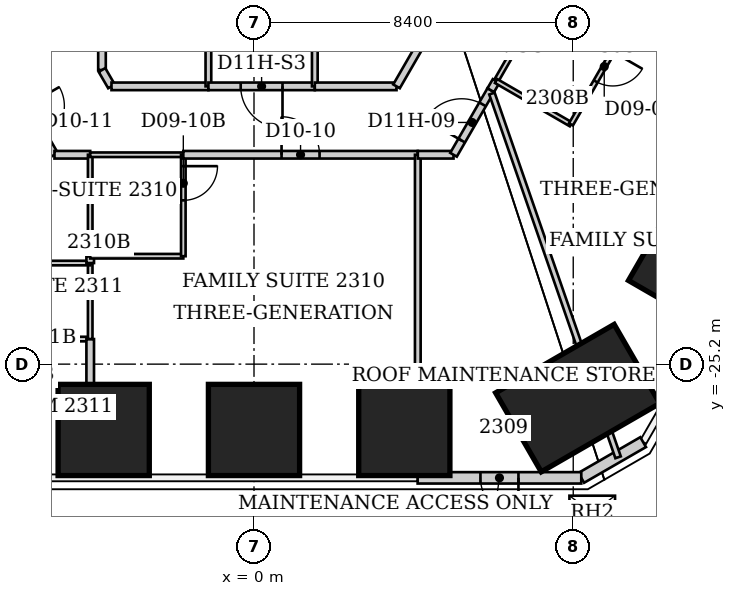
"""IFC4 building model, lengths in metres.
Left out: names, types, materials, properties, quantities, classifications, styles, units other than length and angle.
Written with IfcOpenShell. Run it as: python <this file> out.ifc"""

import sys

from ifc_helpers import new_model, si_unit, direction, frame, frame_2d, origin, origin_2d, place, context, subcontext, project, spatial, rectangle, extrude, clip, halfspace, element, fill, save


model = new_model("IFC4")
c1 = context("Model", 3, precision=1e-05, world=origin(), true_north=direction((0.0, 1.0)))
c2 = subcontext(c1, "Body", "Model", "MODEL_VIEW")
j1 = project(units=[si_unit("LENGTHUNIT", "METRE"), si_unit("PLANEANGLEUNIT", "RADIAN")], contexts=[c1])
p1 = place(None, origin())
s1 = spatial("IfcSite", under=j1, at=p1, CompositionType="ELEMENT")
p2 = place(p1, origin())
s2 = spatial("IfcBuilding", under=s1, at=p2, CompositionType="ELEMENT")
p3 = place(p2, frame((0.0, 0.0, 96.8)))
s3 = spatial("IfcBuildingStorey", under=s2, at=p3, CompositionType="ELEMENT", Elevation=96.8)
p4 = place(p3, frame((11.494, -22.559, -0.073), z_axis=(0.0, 0.0, 1.0), x_axis=(0.866025403784, -0.5, 0.0)))
e1 = element("IfcColumn", 1, at=p4, inside=s3, PredefinedType="COLUMN", context=c2, shape_type="SweptSolid", body=[
    clip(extrude(rectangle(XDim=2.4, YDim=2.4, at=origin_2d()), origin(), (0.0, 0.0, 1.0), 3.873), halfspace(frame((0.0, 0.0, 0.073)), True)),
])
p5 = place(p3, frame((8.518, -26.094, -0.074), z_axis=(0.0, 0.0, 1.0), x_axis=(0.5, -0.866025403784, 0.0)))
e2 = element("IfcColumn", 2, at=p5, inside=s3, PredefinedType="COLUMN", context=c2, shape_type="SweptSolid", body=[
    clip(extrude(rectangle(XDim=2.4, YDim=3.6, at=origin_2d()), origin(), (0.0, 0.0, 1.0), 3.874), halfspace(frame((0.0, 0.0, 0.074)), True)),
])
p6 = place(p3, frame((3.955, -26.932, -0.063), z_axis=(0.0, 0.0, 1.0), x_axis=(0.0, -1.0, 0.0)))
e3 = element("IfcColumn", 3, at=p6, inside=s3, PredefinedType="COLUMN", context=c2, shape_type="SweptSolid", body=[
    clip(extrude(rectangle(XDim=2.4, YDim=2.4, at=origin_2d()), origin(), (0.0, 0.0, 1.0), 3.863), halfspace(frame((0.0, 0.0, 0.063)), True)),
])
p7 = place(p3, frame((0.0, -26.932, -0.055), z_axis=(0.0, 0.0, 1.0), x_axis=(0.0, -1.0, 0.0)))
e4 = element("IfcColumn", 4, at=p7, inside=s3, PredefinedType="COLUMN", context=c2, shape_type="SweptSolid", body=[
    clip(extrude(rectangle(XDim=2.4, YDim=2.4, at=origin_2d()), origin(), (0.0, 0.0, 1.0), 3.855), halfspace(frame((0.0, 0.0, 0.055)), True)),
])
p8 = place(p3, frame((-3.955, -26.932, -0.063), z_axis=(0.0, 0.0, 1.0), x_axis=(0.0, -1.0, 0.0)))
e5 = element("IfcColumn", 5, at=p8, inside=s3, PredefinedType="COLUMN", context=c2, shape_type="SweptSolid", body=[
    clip(extrude(rectangle(XDim=2.4, YDim=2.4, at=origin_2d()), origin(), (0.0, 0.0, 1.0), 3.863), halfspace(frame((0.0, 0.0, 0.063)), True)),
])
p9 = place(p3, frame((10.24, -27.252, 0.0), z_axis=(0.0, 0.0, 1.0), x_axis=(-0.866045024864, -0.499966013754, 0.0)))
e6 = element("IfcWall", 6, at=p9, inside=s3, PredefinedType="SOLIDWALL", context=c2, shape_type="SweptSolid", body=[
    extrude(rectangle(XDim=1.88, YDim=0.3, at=frame_2d((0.94, 0.0))), origin(), (0.0, 0.0, 1.0), 3.64),
])
p10 = place(p3, frame((8.611, -28.192, 0.0), z_axis=(0.0, 0.0, 1.0), x_axis=(-1.0, 0.0, 0.0)))
e7 = element("IfcWall", 7, at=p10, inside=s3, PredefinedType="SOLIDWALL", context=c2, shape_type="SweptSolid", body=[
    extrude(rectangle(XDim=4.306, YDim=0.3, at=frame_2d((2.153, 0.0))), origin(), (0.0, 0.0, 1.0), 3.64),
])
p11 = place(p10, frame((1.653, 0.0, 0.0)))
e8 = element("IfcOpeningElement", 8, at=p11, cuts=e7, PredefinedType="OPENING", context=c2, shape_type="SweptSolid", body=[
    extrude(rectangle(XDim=1.0, YDim=2.2, at=frame_2d((0.5, 1.1))), frame((0.0, 0.15, 0.0), z_axis=(0.0, -1.0, 0.0), x_axis=(1.0, 0.0, 0.0)), (0.0, 0.0, 1.0), 0.3),
])
p12 = place(p3, frame((9.301, -30.167, 0.0), z_axis=(0.0, 0.0, 1.0), x_axis=(0.865627711351, 0.500688191733, 0.0)))
e9 = element("IfcWall", 9, at=p12, inside=s3, PredefinedType="PARAPET", context=c2, shape_type="SweptSolid", body=[
    extrude(rectangle(XDim=1.991, YDim=0.25, at=frame_2d((0.996, 0.0))), origin(), (0.0, 0.0, 1.0), 1.1),
])
p13 = place(p3, frame((-6.71, -24.54, 0.0), z_axis=(0.0, 0.0, 1.0), x_axis=(1.0, 0.0, 0.0)))
e10 = element("IfcWall", 10, at=p13, inside=s3, PredefinedType="PARTITIONING", context=c2, shape_type="SweptSolid", body=[
    extrude(rectangle(XDim=2.4, YDim=0.12, at=frame_2d((1.2, 0.0))), origin(), (0.0, 0.0, 1.0), 3.64),
])
p14 = place(p13, frame((0.45, 0.0, 0.0)))
e11 = element("IfcOpeningElement", 11, at=p14, cuts=e10, PredefinedType="OPENING", context=c2, shape_type="SweptSolid", body=[
    extrude(rectangle(XDim=0.9, YDim=2.03, at=frame_2d((0.45, 1.015))), frame((0.0, 0.06, 0.0), z_axis=(0.0, -1.0, 0.0), x_axis=(1.0, 0.0, 0.0)), (0.0, 0.0, 1.0), 0.12),
])
p15 = place(p3, frame((-6.23, -17.99, 0.0), z_axis=(0.0, 0.0, 1.0), x_axis=(0.499431599995, -0.866353321068, 0.0)))
e12 = element("IfcWall", 12, at=p15, inside=s3, PredefinedType="PARTITIONING", context=c2, shape_type="SweptSolid", body=[
    extrude(rectangle(XDim=1.962, YDim=0.2, at=frame_2d((0.981, 0.0))), origin(), (0.0, 0.0, 1.0), 3.64),
])
p16 = place(p15, frame((0.481, 0.0, 0.0)))
e13 = element("IfcOpeningElement", 13, at=p16, cuts=e12, PredefinedType="OPENING", context=c2, shape_type="SweptSolid", body=[
    extrude(rectangle(XDim=1.0, YDim=2.13, at=frame_2d((0.5, 1.065))), frame((0.0, 0.1, 0.0), z_axis=(0.0, -1.0, 0.0), x_axis=(1.0, 0.0, 0.0)), (0.0, 0.0, 1.0), 0.2),
])
p17 = place(p3, frame((-5.25, -19.69, 0.0), z_axis=(0.0, 0.0, 1.0), x_axis=(1.0, 0.0, 0.0)))
e14 = element("IfcWall", 14, at=p17, inside=s3, PredefinedType="PARTITIONING", context=c2, shape_type="SweptSolid", body=[
    extrude(rectangle(XDim=0.94, YDim=0.2, at=frame_2d((0.47, 0.0))), origin(), (0.0, 0.0, 1.0), 3.64),
])
p18 = place(p3, frame((-4.31, -28.07, 0.0), z_axis=(0.0, 0.0, 1.0), x_axis=(0.0, 1.0, 0.0)))
e15 = element("IfcWall", 15, at=p18, inside=s3, PredefinedType="PARTITIONING", context=c2, shape_type="SweptSolid", body=[
    extrude(rectangle(XDim=3.53, YDim=0.2, at=frame_2d((1.765, 0.0))), origin(), (0.0, 0.0, 1.0), 3.64),
])
p19 = place(p3, frame((-4.31, -24.54, 0.0), z_axis=(0.0, 0.0, 1.0), x_axis=(0.0, 1.0, 0.0)))
e16 = element("IfcWall", 16, at=p19, inside=s3, PredefinedType="PARTITIONING", context=c2, shape_type="SweptSolid", body=[
    extrude(rectangle(XDim=2.0, YDim=0.12, at=frame_2d((1.0, 0.0))), origin(), (0.0, 0.0, 1.0), 3.64),
])
p20 = place(p3, frame((-4.31, -22.54, 0.0), z_axis=(0.0, 0.0, 1.0), x_axis=(-1.0, 0.0, 0.0)))
e17 = element("IfcWall", 17, at=p20, inside=s3, PredefinedType="PARTITIONING", context=c2, shape_type="SweptSolid", body=[
    extrude(rectangle(XDim=2.4, YDim=0.12, at=frame_2d((1.2, 0.0))), origin(), (0.0, 0.0, 1.0), 3.64),
])
p21 = place(p3, frame((-4.31, -22.54, 0.0), z_axis=(0.0, 0.0, 1.0), x_axis=(0.0, 1.0, 0.0)))
e18 = element("IfcWall", 18, at=p21, inside=s3, PredefinedType="PARTITIONING", context=c2, shape_type="SweptSolid", body=[
    extrude(rectangle(XDim=0.18, YDim=0.2, at=frame_2d((0.09, 0.0))), origin(), (0.0, 0.0, 1.0), 3.64),
])
p22 = place(p3, frame((-4.31, -22.36, 0.0), z_axis=(0.0, 0.0, 1.0), x_axis=(0.0, 1.0, 0.0)))
e19 = element("IfcWall", 19, at=p22, inside=s3, PredefinedType="PARTITIONING", context=c2, shape_type="SweptSolid", body=[
    extrude(rectangle(XDim=2.67, YDim=0.12, at=frame_2d((1.335, 0.0))), origin(), (0.0, 0.0, 1.0), 3.64),
])
for number, where, z_axis, x_axis in (
    (20, (-4.31, -22.36, 0.0), (0.0, 0.0, 1.0), (1.0, 0.0, 0.0)),
    (21, (-4.31, -19.69, 0.0), (0.0, 0.0, 1.0), (1.0, 0.0, 0.0)),
):
    element("IfcWall", number, at=place(p3, frame(where, z_axis=z_axis, x_axis=x_axis)), inside=s3, PredefinedType="PARTITIONING", context=c2, shape_type="SweptSolid", body=[
        extrude(rectangle(XDim=2.45, YDim=0.12, at=frame_2d((1.225, 0.0))), origin(), (0.0, 0.0, 1.0), 3.64),
    ])
p23 = place(p3, frame((-4.0, -17.46, 0.0), z_axis=(0.0, 0.0, 1.0), x_axis=(0.0, 1.0, 0.0)))
e22 = element("IfcWall", 22, at=p23, inside=s3, PredefinedType="PARTITIONING", context=c2, shape_type="SweptSolid", body=[
    extrude(rectangle(XDim=3.71, YDim=0.2, at=frame_2d((1.855, 0.0))), origin(), (0.0, 0.0, 1.0), 2.878),
])
p24 = place(p23, frame((1.305, 0.0, 0.0)))
e23 = element("IfcOpeningElement", 23, at=p24, cuts=e22, PredefinedType="OPENING", context=c2, shape_type="SweptSolid", body=[
    extrude(rectangle(XDim=1.1, YDim=2.2, at=frame_2d((0.55, 1.1))), frame((0.0, 0.1, 0.0), z_axis=(0.0, -1.0, 0.0), x_axis=(1.0, 0.0, 0.0)), (0.0, 0.0, 1.0), 0.2),
])
p25 = place(p3, frame((-3.75, -17.89, 0.0), z_axis=(0.0, 0.0, 1.0), x_axis=(-0.502680181512, 0.864472460588, 0.0)))
e24 = element("IfcWall", 24, at=p25, inside=s3, PredefinedType="PARTITIONING", context=c2, shape_type="SweptSolid", body=[
    extrude(rectangle(XDim=0.497, YDim=0.2, at=frame_2d((0.249, 0.0))), origin(), (0.0, 0.0, 1.0), 3.64),
])
p26 = place(p3, frame((-1.86, -22.36, 0.0), z_axis=(0.0, 0.0, 1.0), x_axis=(0.0, 1.0, 0.0)))
e25 = element("IfcWall", 25, at=p26, inside=s3, PredefinedType="PARTITIONING", context=c2, shape_type="SweptSolid", body=[
    extrude(rectangle(XDim=2.67, YDim=0.12, at=frame_2d((1.335, 0.0))), origin(), (0.0, 0.0, 1.0), 2.86),
])
p27 = place(p26, frame((1.47, 0.0, 0.0)))
e26 = element("IfcOpeningElement", 26, at=p27, cuts=e25, PredefinedType="OPENING", context=c2, shape_type="SweptSolid", body=[
    extrude(rectangle(XDim=0.9, YDim=2.03, at=frame_2d((0.45, 1.015))), frame((0.0, 0.06, 0.0), z_axis=(0.0, -1.0, 0.0), x_axis=(1.0, 0.0, 0.0)), (0.0, 0.0, 1.0), 0.12),
])
p28 = place(p3, frame((-1.86, -19.69, 0.0), z_axis=(0.0, 0.0, 1.0), x_axis=(1.0, 0.0, 0.0)))
e27 = element("IfcWall", 27, at=p28, inside=s3, PredefinedType="PARTITIONING", context=c2, shape_type="SweptSolid", body=[
    extrude(rectangle(XDim=6.17, YDim=0.2, at=frame_2d((3.085, 0.0))), origin(), (0.0, 0.0, 1.0), 3.64),
])
p29 = place(p28, frame((2.585, 0.0, 0.0)))
e28 = element("IfcOpeningElement", 28, at=p29, cuts=e27, PredefinedType="OPENING", context=c2, shape_type="SweptSolid", body=[
    extrude(rectangle(XDim=1.0, YDim=2.13, at=frame_2d((0.5, 1.065))), frame((0.0, 0.1, 0.0), z_axis=(0.0, -1.0, 0.0), x_axis=(1.0, 0.0, 0.0)), (0.0, 0.0, 1.0), 0.2),
])
p30 = place(p3, frame((-1.2, -17.89, 0.0), z_axis=(0.0, 0.0, 1.0), x_axis=(-1.0, 0.0, 0.0)))
e29 = element("IfcWall", 29, at=p30, inside=s3, PredefinedType="PARTITIONING", context=c2, shape_type="SweptSolid", body=[
    extrude(rectangle(XDim=2.55, YDim=0.2, at=frame_2d((1.275, 0.0))), origin(), (0.0, 0.0, 1.0), 3.64),
])
p31 = place(p3, frame((-1.2, -13.75, 0.0), z_axis=(0.0, 0.0, 1.0), x_axis=(0.0, -1.0, 0.0)))
e30 = element("IfcWall", 30, at=p31, inside=s3, PredefinedType="PARTITIONING", context=c2, shape_type="SweptSolid", body=[
    extrude(rectangle(XDim=4.14, YDim=0.15, at=frame_2d((2.07, 0.0))), origin(), (0.0, 0.0, 1.0), 3.64),
])
p32 = place(p3, frame((1.6, -17.89, 0.0), z_axis=(0.0, 0.0, 1.0), x_axis=(-1.0, 0.0, 0.0)))
e31 = element("IfcWall", 31, at=p32, inside=s3, PredefinedType="PARTITIONING", context=c2, shape_type="SweptSolid", body=[
    extrude(rectangle(XDim=2.8, YDim=0.2, at=frame_2d((1.4, 0.0))), origin(), (0.0, 0.0, 1.0), 3.64),
])
p33 = place(p32, frame((0.85, 0.0, 0.0)))
e32 = element("IfcOpeningElement", 32, at=p33, cuts=e31, PredefinedType="OPENING", context=c2, shape_type="SweptSolid", body=[
    extrude(rectangle(XDim=1.1, YDim=2.2, at=frame_2d((0.55, 1.1))), frame((0.0, 0.1, 0.0), z_axis=(0.0, -1.0, 0.0), x_axis=(1.0, 0.0, 0.0)), (0.0, 0.0, 1.0), 0.2),
])
p34 = place(p3, frame((1.6, -13.8, 0.0), z_axis=(0.0, 0.0, 1.0), x_axis=(0.0, -1.0, 0.0)))
e33 = element("IfcWall", 33, at=p34, inside=s3, PredefinedType="PARTITIONING", context=c2, shape_type="SweptSolid", body=[
    extrude(rectangle(XDim=4.09, YDim=0.15, at=frame_2d((2.045, 0.0))), origin(), (0.0, 0.0, 1.0), 3.64),
])
p35 = place(p3, frame((3.75, -17.89, 0.0), z_axis=(0.0, 0.0, 1.0), x_axis=(-1.0, 0.0, 0.0)))
e34 = element("IfcWall", 34, at=p35, inside=s3, PredefinedType="PARTITIONING", context=c2, shape_type="SweptSolid", body=[
    extrude(rectangle(XDim=2.15, YDim=0.2, at=frame_2d((1.075, 0.0))), origin(), (0.0, 0.0, 1.0), 3.64),
])
p36 = place(p3, frame((4.31, -28.07, 0.0), z_axis=(0.0, 0.0, 1.0), x_axis=(0.0, 1.0, 0.0)))
e35 = element("IfcWall", 35, at=p36, inside=s3, PredefinedType="PARTITIONING", context=c2, shape_type="SweptSolid", body=[
    extrude(rectangle(XDim=8.38, YDim=0.15, at=frame_2d((4.19, 0.0))), origin(), (0.0, 0.0, 1.0), 3.64),
])
p37 = place(p3, frame((4.31, -19.69, 0.0), z_axis=(0.0, 0.0, 1.0), x_axis=(1.0, 0.0, 0.0)))
e36 = element("IfcWall", 36, at=p37, inside=s3, PredefinedType="PARTITIONING", context=c2, shape_type="SweptSolid", body=[
    extrude(rectangle(XDim=0.94, YDim=0.2, at=frame_2d((0.47, 0.0))), origin(), (0.0, 0.0, 1.0), 3.64),
])
p38 = place(p3, frame((5.25, -19.69, 0.0), z_axis=(0.0, 0.0, 1.0), x_axis=(0.499431599995, 0.866353321068, 0.0)))
e37 = element("IfcWall", 37, at=p38, inside=s3, PredefinedType="PARTITIONING", context=c2, shape_type="SweptSolid", body=[
    extrude(rectangle(XDim=1.962, YDim=0.2, at=frame_2d((0.981, 0.0))), origin(), (0.0, 0.0, 1.0), 3.64),
])
p39 = place(p38, frame((0.431, 0.0, 0.0)))
e38 = element("IfcOpeningElement", 38, at=p39, cuts=e37, PredefinedType="OPENING", context=c2, shape_type="SweptSolid", body=[
    extrude(rectangle(XDim=1.1, YDim=2.2, at=frame_2d((0.55, 1.1))), frame((0.0, 0.1, 0.0), z_axis=(0.0, -1.0, 0.0), x_axis=(1.0, 0.0, 0.0)), (0.0, 0.0, 1.0), 0.2),
])
p40 = place(p3, frame((6.083, -13.85, 0.0), z_axis=(0.0, 0.0, 1.0), x_axis=(-0.499977643516, -0.866038310922, 0.0)))
e39 = element("IfcWall", 39, at=p40, inside=s3, PredefinedType="PARTITIONING", context=c2, shape_type="SweptSolid", body=[
    extrude(rectangle(XDim=4.665, YDim=0.2, at=frame_2d((2.333, 0.0))), origin(), (0.0, 0.0, 1.0), 3.64),
])
p41 = place(p3, frame((6.23, -17.99, 0.0), z_axis=(0.0, 0.0, 1.0), x_axis=(0.503597773627, 0.863938239921, 0.0)))
e40 = element("IfcWall", 40, at=p41, inside=s3, PredefinedType="PARTITIONING", context=c2, shape_type="SweptSolid", body=[
    extrude(rectangle(XDim=0.278, YDim=0.2, at=frame_2d((0.139, 0.0))), origin(), (0.0, 0.0, 1.0), 3.64),
])
p42 = place(p3, frame((6.37, -17.75, 0.0), z_axis=(0.0, 0.0, 1.0), x_axis=(0.499159685399, 0.866510016372, 0.0)))
e41 = element("IfcWall", 41, at=p42, inside=s3, PredefinedType="PARTITIONING", context=c2, shape_type="SweptSolid", body=[
    extrude(rectangle(XDim=2.504, YDim=0.12, at=frame_2d((1.252, 0.0))), origin(), (0.0, 0.0, 1.0), 3.64),
])
p43 = place(p3, frame((6.37, -17.75, 0.0), z_axis=(0.0, 0.0, 1.0), x_axis=(0.865543766642, -0.500833293649, 0.0)))
e42 = element("IfcWall", 42, at=p43, inside=s3, PredefinedType="PARTITIONING", context=c2, shape_type="SweptSolid", body=[
    extrude(rectangle(XDim=2.276, YDim=0.12, at=frame_2d((1.138, 0.0))), origin(), (0.0, 0.0, 1.0), 3.64),
])
p44 = place(p3, frame((8.34, -18.89, 0.0), z_axis=(0.0, 0.0, 1.0), x_axis=(0.499159685399, 0.866510016372, 0.0)))
e43 = element("IfcWall", 43, at=p44, inside=s3, PredefinedType="PARTITIONING", context=c2, shape_type="SweptSolid", body=[
    extrude(rectangle(XDim=2.504, YDim=0.12, at=frame_2d((1.252, 0.0))), origin(), (0.0, 0.0, 1.0), 3.64),
])
p45 = place(p44, frame((1.304, 0.0, 0.0)))
e44 = element("IfcOpeningElement", 44, at=p45, cuts=e43, PredefinedType="OPENING", context=c2, shape_type="SweptSolid", body=[
    extrude(rectangle(XDim=0.9, YDim=2.03, at=frame_2d((0.45, 1.015))), frame((0.0, 0.06, 0.0), z_axis=(0.0, -1.0, 0.0), x_axis=(1.0, 0.0, 0.0)), (0.0, 0.0, 1.0), 0.12),
])
p46 = place(p3, frame((9.58, -27.652, 0.0), z_axis=(0.0, 0.0, 1.0), x_axis=(-0.327598862793, 0.944816905594, 0.0)))
e45 = element("IfcWall", 45, at=p46, inside=s3, PredefinedType="PARTITIONING", context=c2, shape_type="SweptSolid", body=[
    extrude(rectangle(XDim=10.131, YDim=0.15, at=frame_2d((5.065, 0.0))), origin(), (0.0, 0.0, 1.0), 3.64),
])
p47 = place(p11, origin())
e46 = element("IfcDoor", 46, at=p47, inside=s3, OperationType="SINGLE_SWING_LEFT", PredefinedType="DOOR", context=c2, shape_type="SweptSolid", body=[
    extrude(rectangle(XDim=1.0, YDim=2.2, at=frame_2d((0.5, 1.1))), frame((0.0, 0.025, 0.0), z_axis=(0.0, -1.0, 0.0), x_axis=(1.0, 0.0, 0.0)), (0.0, 0.0, 1.0), 0.05),
])
fill(e8, e46)
p48 = place(p3, frame((0.0, 0.0, -0.2)))
p49 = place(p48, frame((8.9, -29.112, 0.0)))
p50 = place(p49, frame((0.0, 0.0, 0.15)))
e47 = element("IfcWindow", 47, at=p50, inside=s3, PartitioningType="SINGLE_PANEL", PredefinedType="SKYLIGHT", context=c2, shape_type="SweptSolid", body=[
    extrude(rectangle(XDim=1.2, YDim=0.9, at=origin_2d()), origin(), (0.0, 0.0, 1.0), 0.05),
])
p51 = place(p45, origin())
e48 = element("IfcDoor", 48, at=p51, inside=s3, OperationType="SINGLE_SWING_RIGHT", PredefinedType="DOOR", context=c2, shape_type="SweptSolid", body=[
    extrude(rectangle(XDim=0.9, YDim=2.03, at=frame_2d((0.45, 1.015))), frame((0.0, 0.025, 0.0), z_axis=(0.0, -1.0, 0.0), x_axis=(1.0, 0.0, 0.0)), (0.0, 0.0, 1.0), 0.05),
])
fill(e44, e48)
p52 = place(p39, origin())
e49 = element("IfcDoor", 49, at=p52, inside=s3, OperationType="SINGLE_SWING_LEFT", PredefinedType="DOOR", context=c2, shape_type="SweptSolid", body=[
    extrude(rectangle(XDim=1.1, YDim=2.2, at=frame_2d((0.55, 1.1))), frame((0.0, 0.025, 0.0), z_axis=(0.0, -1.0, 0.0), x_axis=(1.0, 0.0, 0.0)), (0.0, 0.0, 1.0), 0.05),
])
fill(e38, e49)
p53 = place(p29, origin())
e50 = element("IfcDoor", 50, at=p53, inside=s3, OperationType="SINGLE_SWING_LEFT", PredefinedType="DOOR", context=c2, shape_type="SweptSolid", body=[
    extrude(rectangle(XDim=1.0, YDim=2.13, at=frame_2d((0.5, 1.065))), frame((0.0, 0.025, 0.0), z_axis=(0.0, -1.0, 0.0), x_axis=(1.0, 0.0, 0.0)), (0.0, 0.0, 1.0), 0.05),
])
fill(e28, e50)
p54 = place(p27, origin())
e51 = element("IfcDoor", 51, at=p54, inside=s3, OperationType="SINGLE_SWING_RIGHT", PredefinedType="DOOR", context=c2, shape_type="SweptSolid", body=[
    extrude(rectangle(XDim=0.9, YDim=2.03, at=frame_2d((0.45, 1.015))), frame((0.0, 0.025, 0.0), z_axis=(0.0, -1.0, 0.0), x_axis=(1.0, 0.0, 0.0)), (0.0, 0.0, 1.0), 0.05),
])
fill(e26, e51)
p55 = place(p33, origin())
e52 = element("IfcDoor", 52, at=p55, inside=s3, OperationType="SINGLE_SWING_LEFT", PredefinedType="DOOR", context=c2, shape_type="SweptSolid", body=[
    extrude(rectangle(XDim=1.1, YDim=2.2, at=frame_2d((0.55, 1.1))), frame((0.0, 0.025, 0.0), z_axis=(0.0, -1.0, 0.0), x_axis=(1.0, 0.0, 0.0)), (0.0, 0.0, 1.0), 0.05),
])
fill(e32, e52)
save(model, sys.argv[1])
